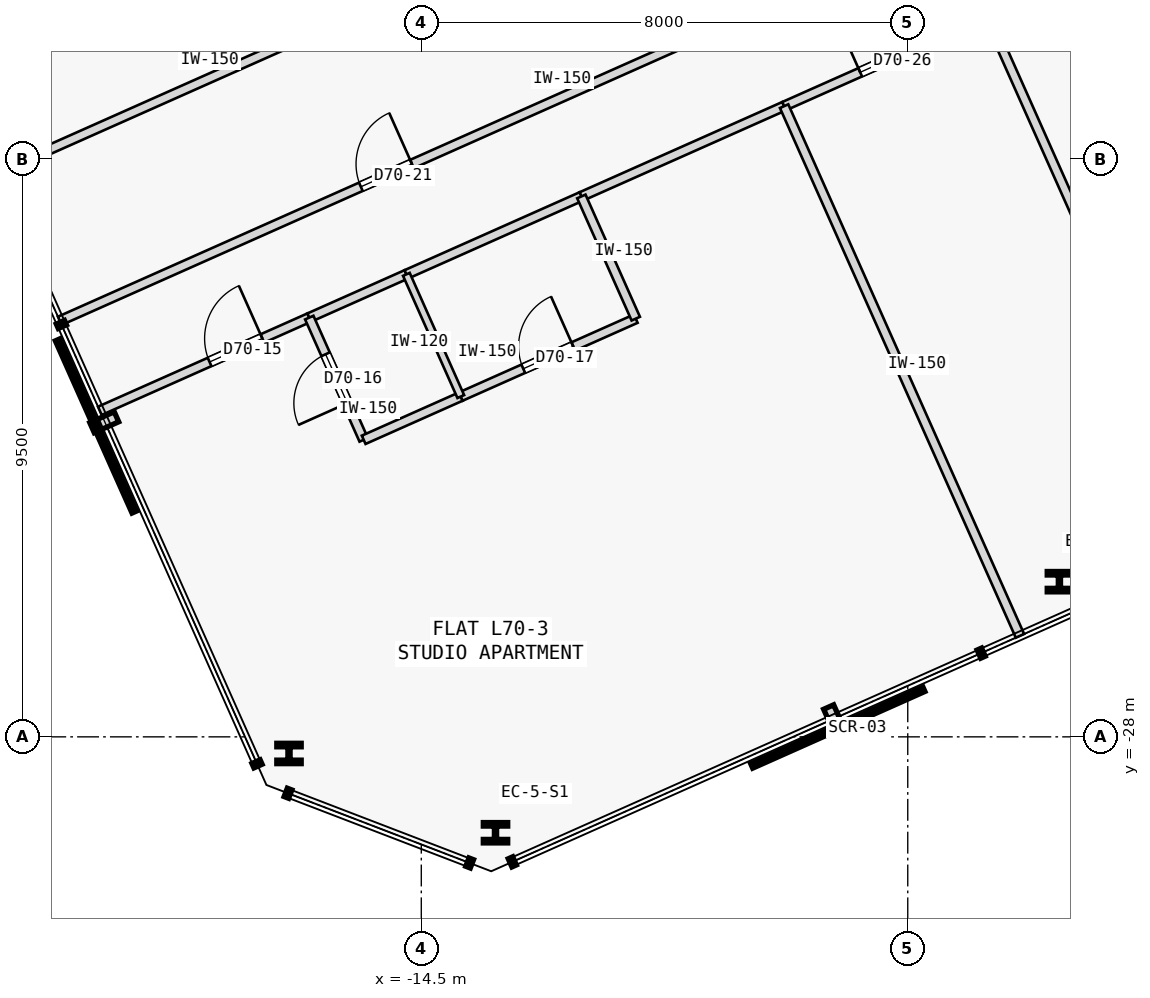
"""IFC4 building model, lengths in metres.
Left out: names, types, materials, properties, quantities, classifications, styles, units other than length and angle.
Written with IfcOpenShell. Run it as: python <this file> out.ifc"""

import sys

from ifc_helpers import new_model, si_unit, direction, frame, frame_2d, origin, origin_2d, place, context, subcontext, project, spatial, rectangle, i_section, extrude, element, fill, save


model = new_model("IFC4")
c1 = context("Model", 3, precision=1e-05, world=origin(), true_north=direction((0.0, 1.0)))
c2 = subcontext(c1, "Body", "Model", "MODEL_VIEW")
j1 = project(units=[si_unit("LENGTHUNIT", "METRE"), si_unit("PLANEANGLEUNIT", "RADIAN")], contexts=[c1])
p1 = place(None, origin())
s1 = spatial("IfcSite", under=j1, at=p1, CompositionType="ELEMENT")
p2 = place(p1, origin())
s2 = spatial("IfcBuilding", under=s1, at=p2, CompositionType="ELEMENT")
p3 = place(p2, frame((0.0, 0.0, 262.2)))
s3 = spatial("IfcBuildingStorey", under=s2, at=p3, CompositionType="ELEMENT", Elevation=262.2)
for number, where, z_axis, x_axis in (
    (1, (-13.28, -29.577, 0.0), (0.0, 0.0, 1.0), (1.0, 0.0, 0.0)),
    (2, (-4.006, -25.448, 0.0), (0.0, 0.0, 1.0), (1.0, 0.0, 0.0)),
    (3, (-16.676, -28.273, 0.0), (0.0, 0.0, 1.0), (1.0, 0.0, 0.0)),
):
    element("IfcColumn", number, at=place(p3, frame(where, z_axis=z_axis, x_axis=x_axis)), inside=s3, PredefinedType="COLUMN", context=c2, shape_type="SweptSolid", body=[
        extrude(i_section(OverallWidth=0.401, OverallDepth=0.335, WebThickness=0.036, FlangeThickness=0.058, FilletRadius=0.015, at=origin_2d()), origin(), (0.0, 0.0, 1.0), 3.35),
    ])
p4 = place(p3, frame((-19.786, -22.639, 0.0), z_axis=(0.0, 0.0, 1.0), x_axis=(0.913541633228, 0.406745232743, 0.0)))
e4 = element("IfcWall", 4, at=p4, inside=s3, PredefinedType="PARTITIONING", context=c2, shape_type="SweptSolid", body=[
    extrude(rectangle(XDim=3.77, YDim=0.15, at=frame_2d((1.885, 0.0))), origin(), (0.0, 0.0, 1.0), 3.125),
])
p5 = place(p4, frame((1.976, 0.0, 0.0)))
e5 = element("IfcOpeningElement", 5, at=p5, cuts=e4, PredefinedType="OPENING", context=c2, shape_type="SweptSolid", body=[
    extrude(rectangle(XDim=0.95, YDim=2.15, at=frame_2d((0.475, 1.075))), frame((0.0, 0.085, 0.0), z_axis=(0.0, -1.0, 0.0), x_axis=(1.0, 0.0, 0.0)), (0.0, 0.0, 1.0), 0.17),
])
p6 = place(p3, frame((-11.868, -19.113, 0.0), z_axis=(0.0, 0.0, 1.0), x_axis=(0.913543802, 0.40674036169, 0.0)))
e6 = element("IfcWall", 6, at=p6, inside=s3, PredefinedType="PARTITIONING", context=c2, shape_type="SweptSolid", body=[
    extrude(rectangle(XDim=3.65, YDim=0.15, at=frame_2d((1.825, 0.0))), origin(), (0.0, 0.0, 1.0), 3.125),
])
p7 = place(p3, frame((-16.342, -21.105, 0.0), z_axis=(0.0, 0.0, 1.0), x_axis=(0.9135579554, 0.406708571492, 0.0)))
e7 = element("IfcWall", 7, at=p7, inside=s3, PredefinedType="PARTITIONING", context=c2, shape_type="SweptSolid", body=[
    extrude(rectangle(XDim=1.748, YDim=0.15, at=frame_2d((0.874, 0.0))), origin(), (0.0, 0.0, 1.0), 3.125),
])
p8 = place(p3, frame((-14.745, -20.394, 0.0), z_axis=(0.0, 0.0, 1.0), x_axis=(0.913542880558, 0.406742431252, 0.0)))
e8 = element("IfcWall", 8, at=p8, inside=s3, PredefinedType="PARTITIONING", context=c2, shape_type="SweptSolid", body=[
    extrude(rectangle(XDim=3.15, YDim=0.15, at=frame_2d((1.575, 0.0))), origin(), (0.0, 0.0, 1.0), 3.125),
])
p9 = place(p3, frame((-20.445, -21.159, 0.0), z_axis=(0.0, 0.0, 1.0), x_axis=(0.913547681516, 0.406731648137, 0.0)))
e9 = element("IfcWall", 9, at=p9, inside=s3, PredefinedType="PARTITIONING", context=c2, shape_type="SweptSolid", body=[
    extrude(rectangle(XDim=11.76, YDim=0.15, at=frame_2d((5.88, 0.0))), origin(), (0.0, 0.0, 1.0), 3.125),
])
p10 = place(p9, frame((5.42, 0.0, 0.0)))
e10 = element("IfcOpeningElement", 10, at=p10, cuts=e9, PredefinedType="OPENING", context=c2, shape_type="SweptSolid", body=[
    extrude(rectangle(XDim=0.92, YDim=2.15, at=frame_2d((0.46, 1.075))), frame((0.0, 0.085, 0.0), z_axis=(0.0, -1.0, 0.0), x_axis=(1.0, 0.0, 0.0)), (0.0, 0.0, 1.0), 0.17),
])
p11 = place(p3, frame((-8.533, -17.628, 0.0), z_axis=(0.0, 0.0, 1.0), x_axis=(0.913560976273, 0.406701785873, 0.0)))
e11 = element("IfcWall", 11, at=p11, inside=s3, PredefinedType="PARTITIONING", context=c2, shape_type="SweptSolid", body=[
    extrude(rectangle(XDim=3.659, YDim=0.15, at=frame_2d((1.829, 0.0))), origin(), (0.0, 0.0, 1.0), 3.125),
])
p12 = place(p11, frame((1.369, 0.0, 0.0)))
e12 = element("IfcOpeningElement", 12, at=p12, cuts=e11, PredefinedType="OPENING", context=c2, shape_type="SweptSolid", body=[
    extrude(rectangle(XDim=0.92, YDim=2.15, at=frame_2d((0.46, 1.075))), frame((0.0, 0.085, 0.0), z_axis=(0.0, -1.0, 0.0), x_axis=(1.0, 0.0, 0.0)), (0.0, 0.0, 1.0), 0.17),
])
p13 = place(p3, frame((-15.448, -23.115, 0.0), z_axis=(0.0, 0.0, 1.0), x_axis=(-0.406725294076, 0.913550510459, 0.0)))
e13 = element("IfcWall", 13, at=p13, inside=s3, PredefinedType="PARTITIONING", context=c2, shape_type="SweptSolid", body=[
    extrude(rectangle(XDim=2.2, YDim=0.15, at=frame_2d((1.1, 0.0))), origin(), (0.0, 0.0, 1.0), 3.125),
])
p14 = place(p13, frame((0.66, 0.0, 0.0)))
e14 = element("IfcOpeningElement", 14, at=p14, cuts=e13, PredefinedType="OPENING", context=c2, shape_type="SweptSolid", body=[
    extrude(rectangle(XDim=0.88, YDim=2.15, at=frame_2d((0.44, 1.075))), frame((0.0, 0.085, 0.0), z_axis=(0.0, -1.0, 0.0), x_axis=(1.0, 0.0, 0.0)), (0.0, 0.0, 1.0), 0.17),
])
p15 = place(p3, frame((-15.448, -23.115, 0.0), z_axis=(0.0, 0.0, 1.0), x_axis=(0.9135579554, 0.406708571492, 0.0)))
e15 = element("IfcWall", 15, at=p15, inside=s3, PredefinedType="PARTITIONING", context=c2, shape_type="SweptSolid", body=[
    extrude(rectangle(XDim=1.748, YDim=0.15, at=frame_2d((0.874, 0.0))), origin(), (0.0, 0.0, 1.0), 3.125),
])
p16 = place(p3, frame((-13.851, -22.404, 0.0), z_axis=(0.0, 0.0, 1.0), x_axis=(0.913542880558, 0.406742431252, 0.0)))
e16 = element("IfcWall", 16, at=p16, inside=s3, PredefinedType="PARTITIONING", context=c2, shape_type="SweptSolid", body=[
    extrude(rectangle(XDim=3.15, YDim=0.15, at=frame_2d((1.575, 0.0))), origin(), (0.0, 0.0, 1.0), 3.125),
])
p17 = place(p16, frame((1.125, 0.0, 0.0)))
e17 = element("IfcOpeningElement", 17, at=p17, cuts=e16, PredefinedType="OPENING", context=c2, shape_type="SweptSolid", body=[
    extrude(rectangle(XDim=0.9, YDim=2.15, at=frame_2d((0.45, 1.075))), frame((0.0, 0.085, 0.0), z_axis=(0.0, -1.0, 0.0), x_axis=(1.0, 0.0, 0.0)), (0.0, 0.0, 1.0), 0.17),
])
p18 = place(p3, frame((-10.973, -21.123, 0.0), z_axis=(0.0, 0.0, 1.0), x_axis=(-0.406725294076, 0.913550510459, 0.0)))
e18 = element("IfcWall", 18, at=p18, inside=s3, PredefinedType="PARTITIONING", context=c2, shape_type="SweptSolid", body=[
    extrude(rectangle(XDim=2.2, YDim=0.15, at=frame_2d((1.1, 0.0))), origin(), (0.0, 0.0, 1.0), 3.125),
])
p19 = place(p3, frame((-4.655, -26.339, 0.0), z_axis=(0.0, 0.0, 1.0), x_axis=(-0.406729927653, 0.913548447512, 0.0)))
e19 = element("IfcWall", 19, at=p19, inside=s3, PredefinedType="PARTITIONING", context=c2, shape_type="SweptSolid", body=[
    extrude(rectangle(XDim=9.535, YDim=0.15, at=frame_2d((4.768, 0.0))), origin(), (0.0, 0.0, 1.0), 3.125),
])
p20 = place(p3, frame((-13.851, -22.404, 0.0), z_axis=(0.0, 0.0, 1.0), x_axis=(-0.406725294076, 0.913550510459, 0.0)))
e20 = element("IfcWall", 20, at=p20, inside=s3, PredefinedType="PARTITIONING", context=c2, shape_type="SweptSolid", body=[
    extrude(rectangle(XDim=2.2, YDim=0.12, at=frame_2d((1.1, 0.0))), origin(), (0.0, 0.0, 1.0), 3.125),
])
p21 = place(p3, frame((-21.52, -18.744, 0.0), z_axis=(0.0, 0.0, 1.0), x_axis=(0.913539967617, 0.406748973651, 0.0)))
e21 = element("IfcWall", 21, at=p21, inside=s3, PredefinedType="PARTITIONING", context=c2, shape_type="SweptSolid", body=[
    extrude(rectangle(XDim=11.76, YDim=0.15, at=frame_2d((5.88, 0.0))), origin(), (0.0, 0.0, 1.0), 3.125),
])
p22 = place(p21, frame((5.42, 0.0, 0.0)))
e22 = element("IfcOpeningElement", 22, at=p22, cuts=e21, PredefinedType="OPENING", context=c2, shape_type="SweptSolid", body=[
    extrude(rectangle(XDim=0.92, YDim=2.15, at=frame_2d((0.46, 1.075))), frame((0.0, 0.085, 0.0), z_axis=(0.0, -1.0, 0.0), x_axis=(1.0, 0.0, 0.0)), (0.0, 0.0, 1.0), 0.17),
])
p23 = place(p3, frame((-1.312, -24.851, 0.0), z_axis=(0.0, 0.0, 1.0), x_axis=(-0.406760810574, 0.913534697196, 0.0)))
e23 = element("IfcWall", 23, at=p23, inside=s3, PredefinedType="PARTITIONING", context=c2, shape_type="SweptSolid", body=[
    extrude(rectangle(XDim=9.535, YDim=0.15, at=frame_2d((4.768, 0.0))), origin(), (0.0, 0.0, 1.0), 3.125),
])
p24 = place(p5, origin())
e24 = element("IfcDoor", 24, at=p24, inside=s3, OperationType="SINGLE_SWING_RIGHT", PredefinedType="DOOR", context=c2, shape_type="SweptSolid", body=[
    extrude(rectangle(XDim=0.95, YDim=2.15, at=frame_2d((0.475, 1.075))), frame((0.0, 0.025, 0.0), z_axis=(0.0, -1.0, 0.0), x_axis=(1.0, 0.0, 0.0)), (0.0, 0.0, 1.0), 0.05),
])
fill(e5, e24)
p25 = place(p14, origin())
e25 = element("IfcDoor", 25, at=p25, inside=s3, OperationType="SINGLE_SWING_LEFT", PredefinedType="DOOR", context=c2, shape_type="SweptSolid", body=[
    extrude(rectangle(XDim=0.88, YDim=2.15, at=frame_2d((0.44, 1.075))), frame((0.0, 0.025, 0.0), z_axis=(0.0, -1.0, 0.0), x_axis=(1.0, 0.0, 0.0)), (0.0, 0.0, 1.0), 0.05),
])
fill(e14, e25)
p26 = place(p17, origin())
e26 = element("IfcDoor", 26, at=p26, inside=s3, OperationType="SINGLE_SWING_RIGHT", PredefinedType="DOOR", context=c2, shape_type="SweptSolid", body=[
    extrude(rectangle(XDim=0.9, YDim=2.15, at=frame_2d((0.45, 1.075))), frame((0.0, 0.025, 0.0), z_axis=(0.0, -1.0, 0.0), x_axis=(1.0, 0.0, 0.0)), (0.0, 0.0, 1.0), 0.05),
])
fill(e17, e26)
p27 = place(p10, origin())
e27 = element("IfcDoor", 27, at=p27, inside=s3, OperationType="SINGLE_SWING_RIGHT", PredefinedType="DOOR", context=c2, shape_type="SweptSolid", body=[
    extrude(rectangle(XDim=0.92, YDim=2.15, at=frame_2d((0.46, 1.075))), frame((0.0, 0.025, 0.0), z_axis=(0.0, -1.0, 0.0), x_axis=(1.0, 0.0, 0.0)), (0.0, 0.0, 1.0), 0.05),
])
fill(e10, e27)
p28 = place(p12, origin())
e28 = element("IfcDoor", 28, at=p28, inside=s3, OperationType="SINGLE_SWING_LEFT", PredefinedType="DOOR", context=c2, shape_type="SweptSolid", body=[
    extrude(rectangle(XDim=0.92, YDim=2.15, at=frame_2d((0.46, 1.075))), frame((0.0, 0.025, 0.0), z_axis=(0.0, -1.0, 0.0), x_axis=(1.0, 0.0, 0.0)), (0.0, 0.0, 1.0), 0.05),
])
fill(e12, e28)
save(model, sys.argv[1])
